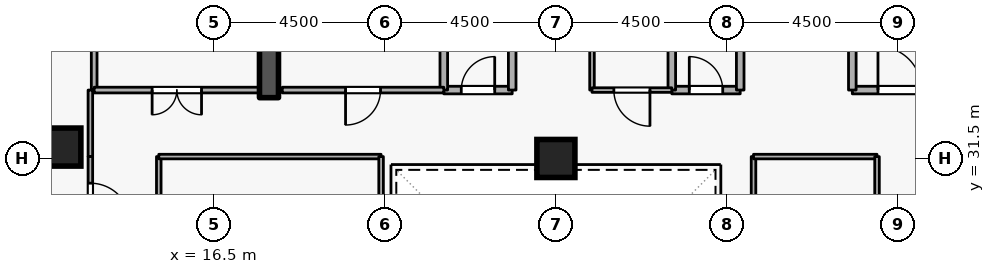
"""IFC4 building model, lengths in metres.
Left out: names, types, materials, properties, quantities, classifications, styles, units other than length and angle.
Written with IfcOpenShell. Run it as: python <this file> out.ifc"""

import sys

from ifc_helpers import new_model, si_unit, direction, frame, frame_2d, origin, origin_2d, place, context, subcontext, project, spatial, rectangle, extrude, element, fill, save


model = new_model("IFC4")
c1 = context("Model", 3, precision=1e-05, world=origin(), true_north=direction((0.0, 1.0)))
c2 = subcontext(c1, "Body", "Model", "MODEL_VIEW")
j1 = project(units=[si_unit("LENGTHUNIT", "METRE"), si_unit("PLANEANGLEUNIT", "RADIAN")], contexts=[c1])
p1 = place(None, origin())
s1 = spatial("IfcSite", under=j1, at=p1, CompositionType="ELEMENT")
p2 = place(p1, origin())
s2 = spatial("IfcBuilding", under=s1, at=p2, CompositionType="ELEMENT")
p3 = place(p2, frame((0.0, 0.0, 207.3)))
s3 = spatial("IfcBuildingStorey", under=s2, at=p3, CompositionType="ELEMENT", Elevation=207.3)
p4 = place(p3, frame((17.95, 33.1, 0.0), z_axis=(0.0, 0.0, 1.0), x_axis=(0.0, 1.0, 0.0)))
e1 = element("IfcWall", 1, at=p4, inside=s3, PredefinedType="SHEAR", context=c2, shape_type="SweptSolid", body=[
    extrude(rectangle(XDim=5.8, YDim=0.5, at=frame_2d((2.9, 0.0))), origin(), (0.0, 0.0, 1.0), 3.6),
])
for number, where, z_axis, x_axis in (
    (2, (12.5, 31.8, 0.0), (0.0, 0.0, 1.0), (1.0, 0.0, 0.0)),
    (3, (25.5, 31.5, 0.0), (0.0, 0.0, 1.0), (1.0, 0.0, 0.0)),
):
    element("IfcColumn", number, at=place(p3, frame(where, z_axis=z_axis, x_axis=x_axis)), inside=s3, PredefinedType="COLUMN", context=c2, shape_type="SweptSolid", body=[
        extrude(rectangle(XDim=1.0, YDim=1.0, at=origin_2d()), origin(), (0.0, 0.0, 1.0), 3.6),
    ])
p5 = place(p3, frame((33.3, 33.3, 0.0), z_axis=(0.0, 0.0, 1.0), x_axis=(1.0, 0.0, 0.0)))
e4 = element("IfcWall", 4, at=p5, inside=s3, PredefinedType="STANDARD", context=c2, shape_type="SweptSolid", body=[
    extrude(rectangle(XDim=2.5, YDim=0.2, at=frame_2d((1.25, 0.0))), origin(), (0.0, 0.0, 1.0), 3.34),
])
p6 = place(p5, frame((0.675, 0.0, 0.0)))
e5 = element("IfcOpeningElement", 5, at=p6, cuts=e4, PredefinedType="OPENING", context=c2, shape_type="SweptSolid", body=[
    extrude(rectangle(XDim=1.15, YDim=2.1, at=frame_2d((0.575, 1.05))), frame((0.0, 0.11, 0.0), z_axis=(0.0, -1.0, 0.0), x_axis=(1.0, 0.0, 0.0)), (0.0, 0.0, 1.0), 0.22),
])
p7 = place(p3, frame((33.3, 35.6, 0.0), z_axis=(0.0, 0.0, 1.0), x_axis=(0.0, -1.0, 0.0)))
e6 = element("IfcWall", 6, at=p7, inside=s3, PredefinedType="STANDARD", context=c2, shape_type="SweptSolid", body=[
    extrude(rectangle(XDim=2.3, YDim=0.2, at=frame_2d((1.15, 0.0))), origin(), (0.0, 0.0, 1.0), 2.545),
])
p8 = place(p3, frame((22.55, 33.3, 0.0), z_axis=(0.0, 0.0, 1.0), x_axis=(1.0, 0.0, 0.0)))
e7 = element("IfcWall", 7, at=p8, inside=s3, PredefinedType="STANDARD", context=c2, shape_type="SweptSolid", body=[
    extrude(rectangle(XDim=1.8, YDim=0.2, at=frame_2d((0.9, 0.0))), origin(), (0.0, 0.0, 1.0), 3.34),
])
p9 = place(p8, frame((0.46, 0.0, 0.0)))
e8 = element("IfcOpeningElement", 8, at=p9, cuts=e7, PredefinedType="OPENING", context=c2, shape_type="SweptSolid", body=[
    extrude(rectangle(XDim=0.88, YDim=2.04, at=frame_2d((0.44, 1.02))), frame((0.0, 0.11, 0.0), z_axis=(0.0, -1.0, 0.0), x_axis=(1.0, 0.0, 0.0)), (0.0, 0.0, 1.0), 0.22),
])
for number, where, z_axis, x_axis in (
    (9, (24.35, 33.3, 0.0), (0.0, 0.0, 1.0), (0.0, 1.0, 0.0)),
    (10, (22.55, 35.35, 0.0), (0.0, 0.0, 1.0), (0.0, -1.0, 0.0)),
):
    element("IfcWall", number, at=place(p3, frame(where, z_axis=z_axis, x_axis=x_axis)), inside=s3, PredefinedType="STANDARD", context=c2, shape_type="SweptSolid", body=[
        extrude(rectangle(XDim=2.05, YDim=0.2, at=frame_2d((1.025, 0.0))), origin(), (0.0, 0.0, 1.0), 3.34),
    ])
p10 = place(p3, frame((28.55, 33.3, 0.0), z_axis=(0.0, 0.0, 1.0), x_axis=(1.0, 0.0, 0.0)))
e11 = element("IfcWall", 11, at=p10, inside=s3, PredefinedType="STANDARD", context=c2, shape_type="SweptSolid", body=[
    extrude(rectangle(XDim=1.8, YDim=0.2, at=frame_2d((0.9, 0.0))), origin(), (0.0, 0.0, 1.0), 3.34),
])
p11 = place(p10, frame((0.46, 0.0, 0.0)))
e12 = element("IfcOpeningElement", 12, at=p11, cuts=e11, PredefinedType="OPENING", context=c2, shape_type="SweptSolid", body=[
    extrude(rectangle(XDim=0.88, YDim=2.04, at=frame_2d((0.44, 1.02))), frame((0.0, 0.11, 0.0), z_axis=(0.0, -1.0, 0.0), x_axis=(1.0, 0.0, 0.0)), (0.0, 0.0, 1.0), 0.22),
])
for number, where, z_axis, x_axis in (
    (13, (30.35, 33.3, 0.0), (0.0, 0.0, 1.0), (0.0, 1.0, 0.0)),
    (14, (28.55, 35.35, 0.0), (0.0, 0.0, 1.0), (0.0, -1.0, 0.0)),
):
    element("IfcWall", number, at=place(p3, frame(where, z_axis=z_axis, x_axis=x_axis)), inside=s3, PredefinedType="STANDARD", context=c2, shape_type="SweptSolid", body=[
        extrude(rectangle(XDim=2.05, YDim=0.2, at=frame_2d((1.025, 0.0))), origin(), (0.0, 0.0, 1.0), 3.34),
    ])
p12 = place(p3, frame((22.55, 33.3, 0.0), z_axis=(0.0, 0.0, 1.0), x_axis=(-1.0, 0.0, 0.0)))
e15 = element("IfcWall", 15, at=p12, inside=s3, PredefinedType="PARTITIONING", context=c2, shape_type="SweptSolid", body=[
    extrude(rectangle(XDim=4.25, YDim=0.15, at=frame_2d((2.125, 0.0))), origin(), (0.0, 0.0, 1.0), 3.34),
])
p13 = place(p12, frame((1.665, 0.0, 0.0)))
e16 = element("IfcOpeningElement", 16, at=p13, cuts=e15, PredefinedType="OPENING", context=c2, shape_type="SweptSolid", body=[
    extrude(rectangle(XDim=0.92, YDim=2.08, at=frame_2d((0.46, 1.04))), frame((0.0, 0.085, 0.0), z_axis=(0.0, -1.0, 0.0), x_axis=(1.0, 0.0, 0.0)), (0.0, 0.0, 1.0), 0.17),
])
p14 = place(p3, frame((26.45, 33.3, 0.0), z_axis=(0.0, 0.0, 1.0), x_axis=(0.0, 1.0, 0.0)))
e17 = element("IfcWall", 17, at=p14, inside=s3, PredefinedType="PARTITIONING", context=c2, shape_type="SweptSolid", body=[
    extrude(rectangle(XDim=2.05, YDim=0.12, at=frame_2d((1.025, 0.0))), origin(), (0.0, 0.0, 1.0), 3.34),
])
p15 = place(p3, frame((28.55, 33.3, 0.0), z_axis=(0.0, 0.0, 1.0), x_axis=(-1.0, 0.0, 0.0)))
e18 = element("IfcWall", 18, at=p15, inside=s3, PredefinedType="PARTITIONING", context=c2, shape_type="SweptSolid", body=[
    extrude(rectangle(XDim=2.1, YDim=0.12, at=frame_2d((1.05, 0.0))), origin(), (0.0, 0.0, 1.0), 3.34),
])
p16 = place(p15, frame((0.575, 0.0, 0.0)))
e19 = element("IfcOpeningElement", 19, at=p16, cuts=e18, PredefinedType="OPENING", context=c2, shape_type="SweptSolid", body=[
    extrude(rectangle(XDim=0.95, YDim=2.1, at=frame_2d((0.475, 1.05))), frame((0.0, 0.07, 0.0), z_axis=(0.0, -1.0, 0.0), x_axis=(1.0, 0.0, 0.0)), (0.0, 0.0, 1.0), 0.14),
])
p17 = place(p3, frame((13.35, 33.3, 0.0), z_axis=(0.0, 0.0, 1.0), x_axis=(0.0, 1.0, 0.0)))
e20 = element("IfcWall", 20, at=p17, inside=s3, PredefinedType="PARTITIONING", context=c2, shape_type="SweptSolid", body=[
    extrude(rectangle(XDim=17.42, YDim=0.15, at=frame_2d((8.71, 0.0))), origin(), (0.0, 0.0, 1.0), 3.34),
])
p18 = place(p3, frame((17.7, 33.3, 0.0), z_axis=(0.0, 0.0, 1.0), x_axis=(-1.0, 0.0, 0.0)))
e21 = element("IfcWall", 21, at=p18, inside=s3, PredefinedType="PARTITIONING", context=c2, shape_type="SweptSolid", body=[
    extrude(rectangle(XDim=4.35, YDim=0.15, at=frame_2d((2.175, 0.0))), origin(), (0.0, 0.0, 1.0), 3.34),
])
p19 = place(p18, frame((1.525, 0.0, 0.0)))
e22 = element("IfcOpeningElement", 22, at=p19, cuts=e21, PredefinedType="OPENING", context=c2, shape_type="SweptSolid", body=[
    extrude(rectangle(XDim=1.3, YDim=2.12, at=frame_2d((0.65, 1.06))), frame((0.0, 0.085, 0.0), z_axis=(0.0, -1.0, 0.0), x_axis=(1.0, 0.0, 0.0)), (0.0, 0.0, 1.0), 0.17),
])
p20 = place(p3, frame((13.25, 33.3, 0.0), z_axis=(0.0, 0.0, 1.0), x_axis=(0.0, -1.0, 0.0)))
e23 = element("IfcWall", 23, at=p20, inside=s3, PredefinedType="PARTITIONING", context=c2, shape_type="SweptSolid", body=[
    extrude(rectangle(XDim=1.75, YDim=0.12, at=frame_2d((0.875, 0.0))), origin(), (0.0, 0.0, 1.0), 3.34),
])
p21 = place(p3, frame((13.25, 31.55, 0.0), z_axis=(0.0, 0.0, 1.0), x_axis=(0.0, -1.0, 0.0)))
e24 = element("IfcWall", 24, at=p21, inside=s3, PredefinedType="PARTITIONING", context=c2, shape_type="SweptSolid", body=[
    extrude(rectangle(XDim=2.45, YDim=0.12, at=frame_2d((1.225, 0.0))), origin(), (0.0, 0.0, 1.0), 3.34),
])
p22 = place(p21, frame((0.7, 0.0, 0.0)))
e25 = element("IfcOpeningElement", 25, at=p22, cuts=e24, PredefinedType="OPENING", context=c2, shape_type="SweptSolid", body=[
    extrude(rectangle(XDim=1.05, YDim=2.1, at=frame_2d((0.525, 1.05))), frame((0.0, 0.07, 0.0), z_axis=(0.0, -1.0, 0.0), x_axis=(1.0, 0.0, 0.0)), (0.0, 0.0, 1.0), 0.14),
])
p23 = place(p3, frame((15.05, 22.45, 0.0), z_axis=(0.0, 0.0, 1.0), x_axis=(0.0, 1.0, 0.0)))
e26 = element("IfcWall", 26, at=p23, inside=s3, PredefinedType="PARTITIONING", context=c2, shape_type="SweptSolid", body=[
    extrude(rectangle(XDim=9.1, YDim=0.12, at=frame_2d((4.55, 0.0))), origin(), (0.0, 0.0, 1.0), 3.34),
])
p24 = place(p23, frame((4.075, 0.0, 0.0)))
e27 = element("IfcOpeningElement", 27, at=p24, cuts=e26, PredefinedType="OPENING", context=c2, shape_type="SweptSolid", body=[
    extrude(rectangle(XDim=0.95, YDim=2.1, at=frame_2d((0.475, 1.05))), frame((0.0, 0.07, 0.0), z_axis=(0.0, -1.0, 0.0), x_axis=(1.0, 0.0, 0.0)), (0.0, 0.0, 1.0), 0.14),
])
p25 = place(p3, frame((15.05, 31.55, 0.0), z_axis=(0.0, 0.0, 1.0), x_axis=(1.0, 0.0, 0.0)))
e28 = element("IfcWall", 28, at=p25, inside=s3, PredefinedType="PARTITIONING", context=c2, shape_type="SweptSolid", body=[
    extrude(rectangle(XDim=5.85, YDim=0.12, at=frame_2d((2.925, 0.0))), origin(), (0.0, 0.0, 1.0), 3.34),
])
for number, where, z_axis, x_axis in (
    (29, (20.9, 31.55, 0.0), (0.0, 0.0, 1.0), (0.0, -1.0, 0.0)),
    (30, (30.7, 22.45, 0.0), (0.0, 0.0, 1.0), (0.0, 1.0, 0.0)),
):
    element("IfcWall", number, at=place(p3, frame(where, z_axis=z_axis, x_axis=x_axis)), inside=s3, PredefinedType="PARTITIONING", context=c2, shape_type="SweptSolid", body=[
        extrude(rectangle(XDim=9.1, YDim=0.12, at=frame_2d((4.55, 0.0))), origin(), (0.0, 0.0, 1.0), 3.34),
    ])
p26 = place(p3, frame((30.7, 31.55, 0.0), z_axis=(0.0, 0.0, 1.0), x_axis=(1.0, 0.0, 0.0)))
e31 = element("IfcWall", 31, at=p26, inside=s3, PredefinedType="PARTITIONING", context=c2, shape_type="SweptSolid", body=[
    extrude(rectangle(XDim=3.25, YDim=0.12, at=frame_2d((1.625, 0.0))), origin(), (0.0, 0.0, 1.0), 3.34),
])
p27 = place(p3, frame((33.95, 31.55, 0.0), z_axis=(0.0, 0.0, 1.0), x_axis=(0.0, -1.0, 0.0)))
e32 = element("IfcWall", 32, at=p27, inside=s3, PredefinedType="PARTITIONING", context=c2, shape_type="SweptSolid", body=[
    extrude(rectangle(XDim=9.1, YDim=0.12, at=frame_2d((4.55, 0.0))), origin(), (0.0, 0.0, 1.0), 3.34),
])
p28 = place(p27, frame((4.075, 0.0, 0.0)))
e33 = element("IfcOpeningElement", 33, at=p28, cuts=e32, PredefinedType="OPENING", context=c2, shape_type="SweptSolid", body=[
    extrude(rectangle(XDim=0.95, YDim=2.1, at=frame_2d((0.475, 1.05))), frame((0.0, 0.07, 0.0), z_axis=(0.0, -1.0, 0.0), x_axis=(1.0, 0.0, 0.0)), (0.0, 0.0, 1.0), 0.14),
])
p29 = place(p6, origin())
e34 = element("IfcDoor", 34, at=p29, inside=s3, OperationType="SINGLE_SWING_LEFT", PredefinedType="DOOR", context=c2, shape_type="SweptSolid", body=[
    extrude(rectangle(XDim=1.15, YDim=2.1, at=frame_2d((0.575, 1.05))), frame((0.0, 0.025, 0.0), z_axis=(0.0, -1.0, 0.0), x_axis=(1.0, 0.0, 0.0)), (0.0, 0.0, 1.0), 0.05),
])
fill(e5, e34)
p30 = place(p9, origin())
e35 = element("IfcDoor", 35, at=p30, inside=s3, OperationType="SINGLE_SWING_RIGHT", PredefinedType="DOOR", context=c2, shape_type="SweptSolid", body=[
    extrude(rectangle(XDim=0.88, YDim=2.04, at=frame_2d((0.44, 1.02))), frame((0.0, 0.025, 0.0), z_axis=(0.0, -1.0, 0.0), x_axis=(1.0, 0.0, 0.0)), (0.0, 0.0, 1.0), 0.05),
])
fill(e8, e35)
p31 = place(p11, origin())
e36 = element("IfcDoor", 36, at=p31, inside=s3, OperationType="SINGLE_SWING_LEFT", PredefinedType="DOOR", context=c2, shape_type="SweptSolid", body=[
    extrude(rectangle(XDim=0.88, YDim=2.04, at=frame_2d((0.44, 1.02))), frame((0.0, 0.025, 0.0), z_axis=(0.0, -1.0, 0.0), x_axis=(1.0, 0.0, 0.0)), (0.0, 0.0, 1.0), 0.05),
])
fill(e12, e36)
p32 = place(p13, origin())
e37 = element("IfcDoor", 37, at=p32, inside=s3, OperationType="SINGLE_SWING_RIGHT", PredefinedType="DOOR", context=c2, shape_type="SweptSolid", body=[
    extrude(rectangle(XDim=0.92, YDim=2.08, at=frame_2d((0.46, 1.04))), frame((0.0, 0.025, 0.0), z_axis=(0.0, -1.0, 0.0), x_axis=(1.0, 0.0, 0.0)), (0.0, 0.0, 1.0), 0.05),
])
fill(e16, e37)
p33 = place(p16, origin())
e38 = element("IfcDoor", 38, at=p33, inside=s3, OperationType="SINGLE_SWING_LEFT", PredefinedType="DOOR", context=c2, shape_type="SweptSolid", body=[
    extrude(rectangle(XDim=0.95, YDim=2.1, at=frame_2d((0.475, 1.05))), frame((0.0, 0.025, 0.0), z_axis=(0.0, -1.0, 0.0), x_axis=(1.0, 0.0, 0.0)), (0.0, 0.0, 1.0), 0.05),
])
fill(e19, e38)
p34 = place(p19, origin())
e39 = element("IfcDoor", 39, at=p34, inside=s3, OperationType="DOUBLE_DOOR_SINGLE_SWING", PredefinedType="DOOR", context=c2, shape_type="SweptSolid", body=[
    extrude(rectangle(XDim=1.3, YDim=2.12, at=frame_2d((0.65, 1.06))), frame((0.0, 0.025, 0.0), z_axis=(0.0, -1.0, 0.0), x_axis=(1.0, 0.0, 0.0)), (0.0, 0.0, 1.0), 0.05),
])
fill(e22, e39)
p35 = place(p22, origin())
e40 = element("IfcDoor", 40, at=p35, inside=s3, OperationType="SINGLE_SWING_RIGHT", PredefinedType="DOOR", context=c2, shape_type="SweptSolid", body=[
    extrude(rectangle(XDim=1.05, YDim=2.1, at=frame_2d((0.525, 1.05))), frame((0.0, 0.025, 0.0), z_axis=(0.0, -1.0, 0.0), x_axis=(1.0, 0.0, 0.0)), (0.0, 0.0, 1.0), 0.05),
])
fill(e25, e40)
save(model, sys.argv[1])
